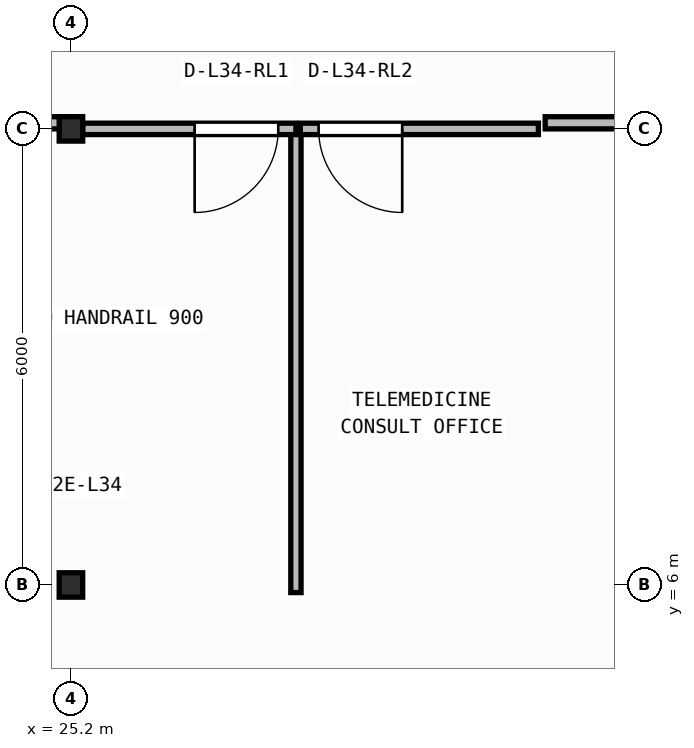
"""IFC4 building model, lengths in metres.
Left out: names, types, materials, properties, quantities, classifications, styles, units other than length and angle.
Written with IfcOpenShell. Run it as: python <this file> out.ifc"""

import sys

from ifc_helpers import new_model, si_unit, direction, frame, frame_2d, origin, origin_2d, place, context, subcontext, project, spatial, rectangle, i_section, extrude, element, fill, save


model = new_model("IFC4")
c1 = context("Model", 3, precision=1e-05, world=origin(), true_north=direction((0.0, 1.0)))
c2 = subcontext(c1, "Body", "Model", "MODEL_VIEW")
j1 = project(units=[si_unit("LENGTHUNIT", "METRE"), si_unit("PLANEANGLEUNIT", "RADIAN")], contexts=[c1])
p1 = place(None, origin())
s1 = spatial("IfcSite", under=j1, at=p1, CompositionType="ELEMENT")
p2 = place(p1, origin())
s2 = spatial("IfcBuilding", under=s1, at=p2, CompositionType="ELEMENT")
p3 = place(p2, frame((0.0, 0.0, 138.9)))
s3 = spatial("IfcBuildingStorey", under=s2, at=p3, CompositionType="ELEMENT", Elevation=138.9)
for number, where, z_axis, x_axis in (
    (1, (25.2, 6.0, 0.0), (0.0, 0.0, 1.0), (1.0, 0.0, 0.0)),
    (2, (25.2, 12.0, 0.0), (0.0, 0.0, 1.0), (1.0, 0.0, 0.0)),
):
    element("IfcColumn", number, at=place(p3, frame(where, z_axis=z_axis, x_axis=x_axis)), inside=s3, PredefinedType="COLUMN", context=c2, shape_type="SweptSolid", body=[
        extrude(i_section(OverallWidth=0.309, OverallDepth=0.321, WebThickness=0.014, FlangeThickness=0.022, FilletRadius=0.017, at=origin_2d()), origin(), (0.0, 0.0, 1.0), 3.95),
    ])
p4 = place(p3, frame((28.16, 5.9, 0.0), z_axis=(0.0, 0.0, 1.0), x_axis=(0.0, 1.0, 0.0)))
e3 = element("IfcWall", 3, at=p4, inside=s3, PredefinedType="PARTITIONING", context=c2, shape_type="SweptSolid", body=[
    extrude(rectangle(XDim=6.1, YDim=0.135, at=frame_2d((3.05, 0.0))), origin(), (0.0, 0.0, 1.0), 3.71),
])
p5 = place(p3, frame((28.16, 12.0, 0.0), z_axis=(0.0, 0.0, 1.0), x_axis=(-1.0, 0.0, 0.0)))
e4 = element("IfcWall", 4, at=p5, inside=s3, PredefinedType="PARTITIONING", context=c2, shape_type="SweptSolid", body=[
    extrude(rectangle(XDim=2.805, YDim=0.15, at=frame_2d((1.403, 0.0))), origin(), (0.0, 0.0, 1.0), 3.083),
])
p6 = place(p5, frame((0.233, 0.0, 0.0)))
e5 = element("IfcOpeningElement", 5, at=p6, cuts=e4, PredefinedType="OPENING", context=c2, shape_type="SweptSolid", body=[
    extrude(rectangle(XDim=1.1, YDim=2.1, at=frame_2d((0.55, 1.05))), frame((0.0, 0.085, 0.0), z_axis=(0.0, -1.0, 0.0), x_axis=(1.0, 0.0, 0.0)), (0.0, 0.0, 1.0), 0.17),
])
p7 = place(p3, frame((31.35, 12.0, 0.0), z_axis=(0.0, 0.0, 1.0), x_axis=(-1.0, 0.0, 0.0)))
e6 = element("IfcWall", 6, at=p7, inside=s3, PredefinedType="PARTITIONING", context=c2, shape_type="SweptSolid", body=[
    extrude(rectangle(XDim=3.133, YDim=0.15, at=frame_2d((1.566, 0.0))), origin(), (0.0, 0.0, 1.0), 3.083),
])
p8 = place(p7, frame((1.792, 0.0, 0.0)))
e7 = element("IfcOpeningElement", 7, at=p8, cuts=e6, PredefinedType="OPENING", context=c2, shape_type="SweptSolid", body=[
    extrude(rectangle(XDim=1.1, YDim=2.1, at=frame_2d((0.55, 1.05))), frame((0.0, 0.085, 0.0), z_axis=(0.0, -1.0, 0.0), x_axis=(1.0, 0.0, 0.0)), (0.0, 0.0, 1.0), 0.17),
])
p9 = place(p3, frame((24.02, 12.08, 0.0), z_axis=(0.0, 0.0, 1.0), x_axis=(1.0, 0.0, 0.0)))
e8 = element("IfcWall", 8, at=p9, inside=s3, PredefinedType="PARTITIONING", context=c2, shape_type="SweptSolid", body=[
    extrude(rectangle(XDim=1.245, YDim=0.16, at=frame_2d((0.623, 0.0))), origin(), (0.0, 0.0, 1.0), 3.083),
])
p10 = place(p3, frame((31.439, 12.08, 0.0), z_axis=(0.0, 0.0, 1.0), x_axis=(1.0, 0.0, 0.0)))
e9 = element("IfcWall", 9, at=p10, inside=s3, PredefinedType="PARTITIONING", context=c2, shape_type="SweptSolid", body=[
    extrude(rectangle(XDim=2.631, YDim=0.16, at=frame_2d((1.315, 0.0))), origin(), (0.0, 0.0, 1.0), 3.083),
])
p11 = place(p6, origin())
e10 = element("IfcDoor", 10, at=p11, inside=s3, OperationType="SINGLE_SWING_RIGHT", PredefinedType="DOOR", context=c2, shape_type="SweptSolid", body=[
    extrude(rectangle(XDim=1.1, YDim=2.1, at=frame_2d((0.55, 1.05))), frame((0.0, 0.025, 0.0), z_axis=(0.0, -1.0, 0.0), x_axis=(1.0, 0.0, 0.0)), (0.0, 0.0, 1.0), 0.05),
])
fill(e5, e10)
p12 = place(p8, origin())
e11 = element("IfcDoor", 11, at=p12, inside=s3, OperationType="SINGLE_SWING_LEFT", PredefinedType="DOOR", context=c2, shape_type="SweptSolid", body=[
    extrude(rectangle(XDim=1.1, YDim=2.1, at=frame_2d((0.55, 1.05))), frame((0.0, 0.025, 0.0), z_axis=(0.0, -1.0, 0.0), x_axis=(1.0, 0.0, 0.0)), (0.0, 0.0, 1.0), 0.05),
])
fill(e7, e11)
save(model, sys.argv[1])
